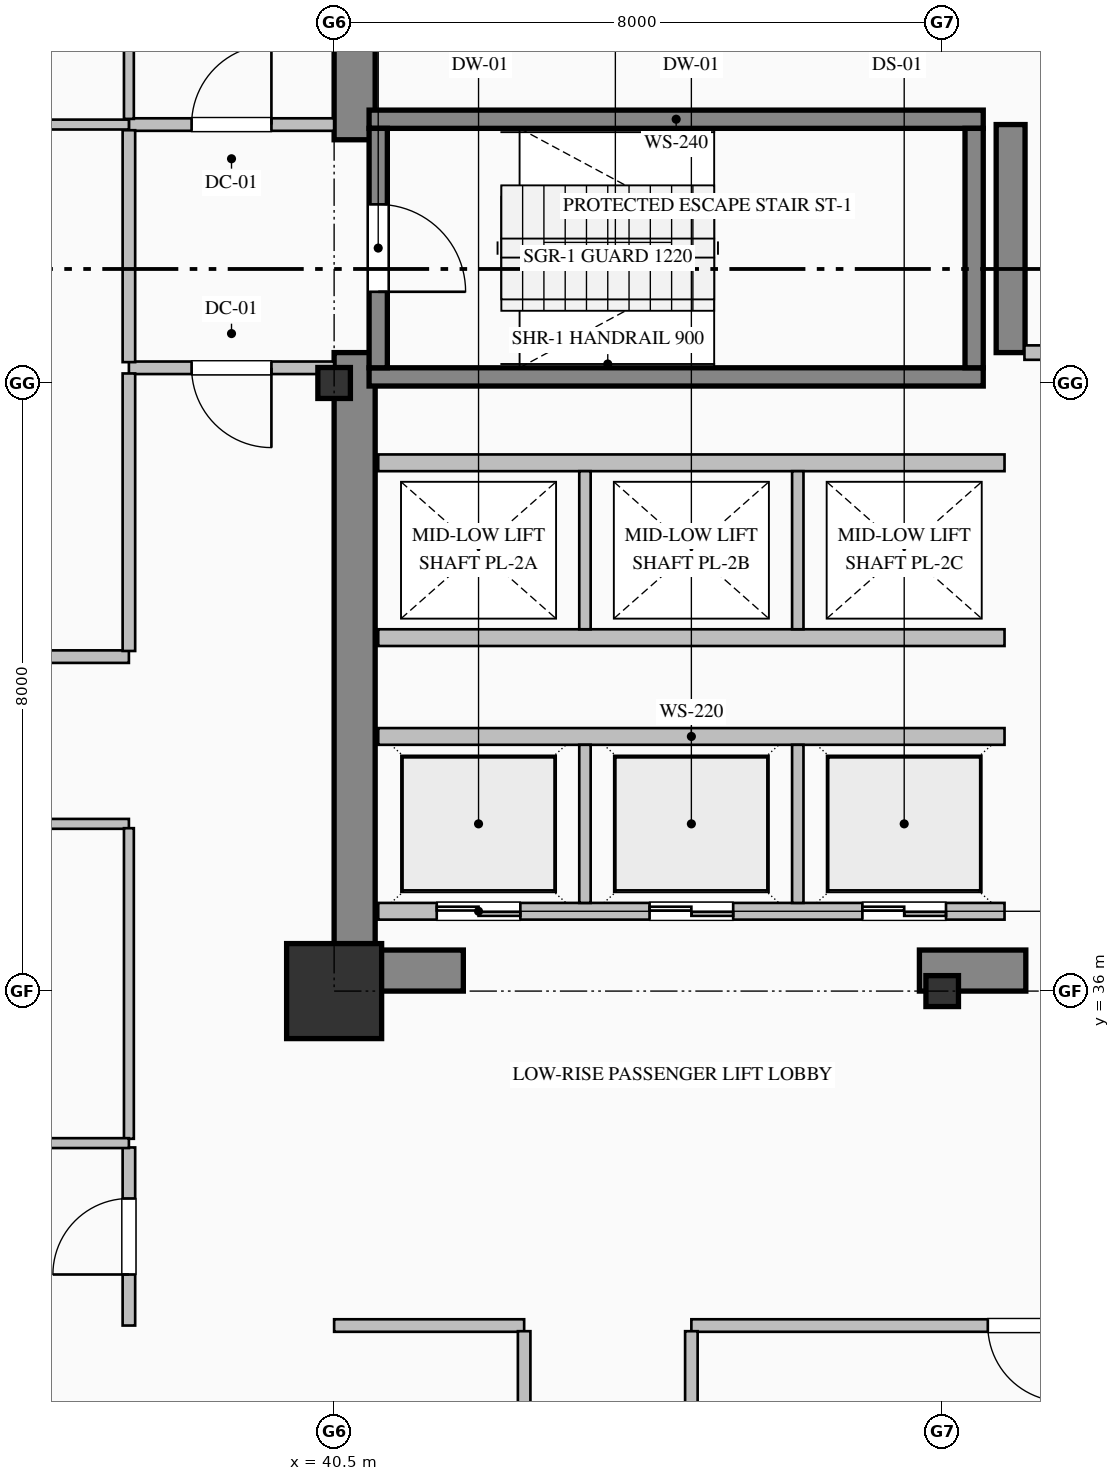
"""IFC4 building model, lengths in metres.
Left out: names, types, materials, properties, quantities, classifications, styles, units other than length and angle.
Written with IfcOpenShell. Run it as: python <this file> out.ifc"""

import sys

from ifc_helpers import new_model, si_unit, direction, frame, frame_2d, origin, origin_2d, place, context, subcontext, project, spatial, rectangle, hollow_rectangle, i_section, extrude, element, fill, save


model = new_model("IFC4")
c1 = context("Model", 3, precision=1e-05, world=origin(), true_north=direction((0.0, 1.0)))
c2 = subcontext(c1, "Body", "Model", "MODEL_VIEW")
j1 = project(units=[si_unit("LENGTHUNIT", "METRE"), si_unit("PLANEANGLEUNIT", "RADIAN")], contexts=[c1])
p1 = place(None, origin())
s1 = spatial("IfcSite", under=j1, at=p1, CompositionType="ELEMENT")
p2 = place(p1, origin())
s2 = spatial("IfcBuilding", under=s1, at=p2, CompositionType="ELEMENT")
p3 = place(p2, frame((0.0, 0.0, 88.2)))
s3 = spatial("IfcBuildingStorey", under=s2, at=p3, CompositionType="ELEMENT", Elevation=88.2)
p4 = place(p3, frame((40.77, 36.54, 0.0), z_axis=(0.0, 0.0, 1.0), x_axis=(0.0, 1.0, 0.0)))
e1 = element("IfcWall", 1, at=p4, inside=s3, PredefinedType="SHEAR", context=c2, shape_type="SweptSolid", body=[
    extrude(rectangle(XDim=7.86, YDim=0.54, at=frame_2d((3.93, 0.0))), origin(), (0.0, 0.0, 1.0), 3.75),
])
p5 = place(p3, frame((40.77, 47.2, 0.0), z_axis=(0.0, 0.0, 1.0), x_axis=(0.0, 1.0, 0.0)))
e2 = element("IfcWall", 2, at=p5, inside=s3, PredefinedType="SHEAR", context=c2, shape_type="SweptSolid", body=[
    extrude(rectangle(XDim=4.26, YDim=0.54, at=frame_2d((2.13, 0.0))), origin(), (0.0, 0.0, 1.0), 3.75),
])
p6 = place(p3, frame((40.5, 36.27, 0.0), z_axis=(0.0, 0.0, 1.0), x_axis=(1.0, 0.0, 0.0)))
e3 = element("IfcWall", 3, at=p6, inside=s3, PredefinedType="SHEAR", context=c2, shape_type="SweptSolid", body=[
    extrude(rectangle(XDim=1.7, YDim=0.54, at=frame_2d((0.85, 0.0))), origin(), (0.0, 0.0, 1.0), 3.75),
])
p7 = place(p3, frame((48.2, 36.27, 0.0), z_axis=(0.0, 0.0, 1.0), x_axis=(1.0, 0.0, 0.0)))
e4 = element("IfcWall", 4, at=p7, inside=s3, PredefinedType="SHEAR", context=c2, shape_type="SweptSolid", body=[
    extrude(rectangle(XDim=1.4, YDim=0.54, at=frame_2d((0.7, 0.0))), origin(), (0.0, 0.0, 1.0), 3.75),
])
p8 = place(p3, frame((49.4, 44.4, 0.0), z_axis=(0.0, 0.0, 1.0), x_axis=(0.0, 1.0, 0.0)))
e5 = element("IfcWall", 5, at=p8, inside=s3, PredefinedType="SHEAR", context=c2, shape_type="SweptSolid", body=[
    extrude(rectangle(XDim=3.0, YDim=0.38, at=frame_2d((1.5, 0.0))), origin(), (0.0, 0.0, 1.0), 3.75),
])
p9 = place(p3, frame((40.5, 36.0, 0.0), z_axis=(0.0, 0.0, 1.0), x_axis=(1.0, 0.0, 0.0)))
e6 = element("IfcColumn", 6, at=p9, inside=s3, PredefinedType="COLUMN", context=c2, shape_type="SweptSolid", body=[
    extrude(hollow_rectangle(XDim=1.25, YDim=1.25, WallThickness=0.045, at=origin_2d()), origin(), (0.0, 0.0, 1.0), 4.0),
])
for number, where, z_axis, x_axis in (
    (7, (40.5, 44.0, 0.0), (0.0, 0.0, 1.0), (1.0, 0.0, 0.0)),
    (8, (48.5, 36.0, 0.0), (0.0, 0.0, 1.0), (1.0, 0.0, 0.0)),
):
    element("IfcColumn", number, at=place(p3, frame(where, z_axis=z_axis, x_axis=x_axis)), inside=s3, PredefinedType="COLUMN", context=c2, shape_type="SweptSolid", body=[
        extrude(i_section(OverallWidth=0.407, OverallDepth=0.428, WebThickness=0.02, FlangeThickness=0.035, FilletRadius=0.022, at=origin_2d()), origin(), (0.0, 0.0, 1.0), 4.0),
    ])
for number, where, z_axis, x_axis in (
    (9, (40.96, 47.47, 0.0), (0.0, 0.0, 1.0), (1.0, 0.0, 0.0)),
    (10, (49.04, 44.08, 0.0), (0.0, 0.0, 1.0), (-1.0, 0.0, 0.0)),
):
    element("IfcWall", number, at=place(p3, frame(where, z_axis=z_axis, x_axis=x_axis)), inside=s3, PredefinedType="SOLIDWALL", context=c2, shape_type="SweptSolid", body=[
        extrude(rectangle(XDim=8.08, YDim=0.24, at=frame_2d((4.04, 0.0))), origin(), (0.0, 0.0, 1.0), 4.0),
    ])
p10 = place(p3, frame((41.08, 47.35, 0.0), z_axis=(0.0, 0.0, 1.0), x_axis=(0.0, -1.0, 0.0)))
e11 = element("IfcWall", 11, at=p10, inside=s3, PredefinedType="SOLIDWALL", context=c2, shape_type="SweptSolid", body=[
    extrude(rectangle(XDim=3.15, YDim=0.24, at=frame_2d((1.575, 0.0))), origin(), (0.0, 0.0, 1.0), 4.0),
])
p11 = place(p10, frame((1.0, 0.0, 0.0)))
e12 = element("IfcOpeningElement", 12, at=p11, cuts=e11, PredefinedType="OPENING", context=c2, shape_type="SweptSolid", body=[
    extrude(rectangle(XDim=1.15, YDim=2.2, at=frame_2d((0.575, 1.1))), frame((0.0, 0.13, 0.0), z_axis=(0.0, -1.0, 0.0), x_axis=(1.0, 0.0, 0.0)), (0.0, 0.0, 1.0), 0.26),
])
p12 = place(p3, frame((48.92, 44.2, 0.0), z_axis=(0.0, 0.0, 1.0), x_axis=(0.0, 1.0, 0.0)))
e13 = element("IfcWall", 13, at=p12, inside=s3, PredefinedType="SOLIDWALL", context=c2, shape_type="SweptSolid", body=[
    extrude(rectangle(XDim=3.15, YDim=0.24, at=frame_2d((1.575, 0.0))), origin(), (0.0, 0.0, 1.0), 4.0),
])
p13 = place(p3, frame((49.32, 37.05, 0.0), z_axis=(0.0, 0.0, 1.0), x_axis=(-1.0, 0.0, 0.0)))
e14 = element("IfcWall", 14, at=p13, inside=s3, PredefinedType="PARTITIONING", context=c2, shape_type="SweptSolid", body=[
    extrude(rectangle(XDim=8.24, YDim=0.22, at=frame_2d((4.12, 0.0))), origin(), (0.0, 0.0, 1.0), 3.75),
])
p14 = place(p13, frame((6.37, 0.0, 0.0)))
e15 = element("IfcOpeningElement", 15, at=p14, cuts=e14, PredefinedType="OPENING", context=c2, shape_type="SweptSolid", body=[
    extrude(rectangle(XDim=1.1, YDim=2.2, at=frame_2d((0.55, 1.1))), frame((0.0, 0.12, 0.0), z_axis=(0.0, -1.0, 0.0), x_axis=(1.0, 0.0, 0.0)), (0.0, 0.0, 1.0), 0.24),
])
p15 = place(p13, frame((3.57, 0.0, 0.0)))
e16 = element("IfcOpeningElement", 16, at=p15, cuts=e14, PredefinedType="OPENING", context=c2, shape_type="SweptSolid", body=[
    extrude(rectangle(XDim=1.1, YDim=2.2, at=frame_2d((0.55, 1.1))), frame((0.0, 0.12, 0.0), z_axis=(0.0, -1.0, 0.0), x_axis=(1.0, 0.0, 0.0)), (0.0, 0.0, 1.0), 0.24),
])
p16 = place(p13, frame((0.77, 0.0, 0.0)))
e17 = element("IfcOpeningElement", 17, at=p16, cuts=e14, PredefinedType="OPENING", context=c2, shape_type="SweptSolid", body=[
    extrude(rectangle(XDim=1.1, YDim=2.2, at=frame_2d((0.55, 1.1))), frame((0.0, 0.12, 0.0), z_axis=(0.0, -1.0, 0.0), x_axis=(1.0, 0.0, 0.0)), (0.0, 0.0, 1.0), 0.24),
])
p17 = place(p3, frame((41.08, 39.35, 0.0), z_axis=(0.0, 0.0, 1.0), x_axis=(1.0, 0.0, 0.0)))
e18 = element("IfcWall", 18, at=p17, inside=s3, PredefinedType="PARTITIONING", context=c2, shape_type="SweptSolid", body=[
    extrude(rectangle(XDim=8.24, YDim=0.22, at=frame_2d((4.12, 0.0))), origin(), (0.0, 0.0, 1.0), 3.75),
])
for number, where, z_axis, x_axis in (
    (19, (43.8, 37.16, 0.0), (0.0, 0.0, 1.0), (0.0, 1.0, 0.0)),
    (20, (46.6, 37.16, 0.0), (0.0, 0.0, 1.0), (0.0, 1.0, 0.0)),
):
    element("IfcWall", number, at=place(p3, frame(where, z_axis=z_axis, x_axis=x_axis)), inside=s3, PredefinedType="PARTITIONING", context=c2, shape_type="SweptSolid", body=[
        extrude(rectangle(XDim=2.08, YDim=0.15, at=frame_2d((1.04, 0.0))), origin(), (0.0, 0.0, 1.0), 3.75),
    ])
for number, where, z_axis, x_axis in (
    (21, (49.32, 40.65, 0.0), (0.0, 0.0, 1.0), (-1.0, 0.0, 0.0)),
    (22, (41.08, 42.95, 0.0), (0.0, 0.0, 1.0), (1.0, 0.0, 0.0)),
):
    element("IfcWall", number, at=place(p3, frame(where, z_axis=z_axis, x_axis=x_axis)), inside=s3, PredefinedType="PARTITIONING", context=c2, shape_type="SweptSolid", body=[
        extrude(rectangle(XDim=8.24, YDim=0.22, at=frame_2d((4.12, 0.0))), origin(), (0.0, 0.0, 1.0), 3.75),
    ])
for number, where, z_axis, x_axis in (
    (23, (43.8, 40.76, 0.0), (0.0, 0.0, 1.0), (0.0, 1.0, 0.0)),
    (24, (46.6, 40.76, 0.0), (0.0, 0.0, 1.0), (0.0, 1.0, 0.0)),
):
    element("IfcWall", number, at=place(p3, frame(where, z_axis=z_axis, x_axis=x_axis)), inside=s3, PredefinedType="PARTITIONING", context=c2, shape_type="SweptSolid", body=[
        extrude(rectangle(XDim=2.08, YDim=0.15, at=frame_2d((1.04, 0.0))), origin(), (0.0, 0.0, 1.0), 3.75),
    ])
p18 = place(p3, frame((37.8, 47.4, 0.0), z_axis=(0.0, 0.0, 1.0), x_axis=(1.0, 0.0, 0.0)))
e25 = element("IfcWall", 25, at=p18, inside=s3, PredefinedType="PARTITIONING", context=c2, shape_type="SweptSolid", body=[
    extrude(rectangle(XDim=2.7, YDim=0.165, at=frame_2d((1.35, 0.0))), origin(), (0.0, 0.0, 1.0), 3.75),
])
p19 = place(p18, frame((0.825, 0.0, 0.0)))
e26 = element("IfcOpeningElement", 26, at=p19, cuts=e25, PredefinedType="OPENING", context=c2, shape_type="SweptSolid", body=[
    extrude(rectangle(XDim=1.05, YDim=2.15, at=frame_2d((0.525, 1.075))), frame((0.0, 0.093, 0.0), z_axis=(0.0, -1.0, 0.0), x_axis=(1.0, 0.0, 0.0)), (0.0, 0.0, 1.0), 0.185),
])
p20 = place(p3, frame((40.5, 44.2, 0.0), z_axis=(0.0, 0.0, 1.0), x_axis=(-1.0, 0.0, 0.0)))
e27 = element("IfcWall", 27, at=p20, inside=s3, PredefinedType="PARTITIONING", context=c2, shape_type="SweptSolid", body=[
    extrude(rectangle(XDim=2.7, YDim=0.165, at=frame_2d((1.35, 0.0))), origin(), (0.0, 0.0, 1.0), 3.75),
])
p21 = place(p20, frame((0.825, 0.0, 0.0)))
e28 = element("IfcOpeningElement", 28, at=p21, cuts=e27, PredefinedType="OPENING", context=c2, shape_type="SweptSolid", body=[
    extrude(rectangle(XDim=1.05, YDim=2.15, at=frame_2d((0.525, 1.075))), frame((0.0, 0.093, 0.0), z_axis=(0.0, -1.0, 0.0), x_axis=(1.0, 0.0, 0.0)), (0.0, 0.0, 1.0), 0.185),
])
p22 = place(p3, frame((37.8, 44.274, 0.0), z_axis=(0.0, 0.0, 1.0), x_axis=(0.0, 1.0, 0.0)))
e29 = element("IfcWall", 29, at=p22, inside=s3, PredefinedType="PARTITIONING", context=c2, shape_type="SweptSolid", body=[
    extrude(rectangle(XDim=3.051, YDim=0.165, at=frame_2d((1.525, 0.0))), origin(), (0.0, 0.0, 1.0), 3.75),
])
p23 = place(p3, frame((37.8, 47.475, 0.0), z_axis=(0.0, 0.0, 1.0), x_axis=(0.0, 1.0, 0.0)))
e30 = element("IfcWall", 30, at=p23, inside=s3, PredefinedType="PARTITIONING", context=c2, shape_type="SweptSolid", body=[
    extrude(rectangle(XDim=4.173, YDim=0.13, at=frame_2d((2.087, 0.0))), origin(), (0.0, 0.0, 1.0), 3.75),
])
p24 = place(p23, frame((1.577, 0.0, 0.0)))
e31 = element("IfcOpeningElement", 31, at=p24, cuts=e30, PredefinedType="OPENING", context=c2, shape_type="SweptSolid", body=[
    extrude(rectangle(XDim=1.02, YDim=2.15, at=frame_2d((0.51, 1.075))), frame((0.0, 0.075, 0.0), z_axis=(0.0, -1.0, 0.0), x_axis=(1.0, 0.0, 0.0)), (0.0, 0.0, 1.0), 0.15),
])
p25 = place(p3, frame((37.8, 47.4, 0.0), z_axis=(0.0, 0.0, 1.0), x_axis=(-1.0, 0.0, 0.0)))
e32 = element("IfcWall", 32, at=p25, inside=s3, PredefinedType="PARTITIONING", context=c2, shape_type="SweptSolid", body=[
    extrude(rectangle(XDim=2.4, YDim=0.13, at=frame_2d((1.2, 0.0))), origin(), (0.0, 0.0, 1.0), 3.75),
])
p26 = place(p3, frame((54.718, 44.4, 0.0), z_axis=(0.0, 0.0, 1.0), x_axis=(-1.0, 0.0, 0.0)))
e33 = element("IfcWall", 33, at=p26, inside=s3, PredefinedType="PARTITIONING", context=c2, shape_type="SweptSolid", body=[
    extrude(rectangle(XDim=5.136, YDim=0.19, at=frame_2d((2.568, 0.0))), origin(), (0.0, 0.0, 1.0), 3.75),
])
p27 = place(p26, frame((2.043, 0.0, 0.0)))
e34 = element("IfcOpeningElement", 34, at=p27, cuts=e33, PredefinedType="OPENING", context=c2, shape_type="SweptSolid", body=[
    extrude(rectangle(XDim=1.05, YDim=2.15, at=frame_2d((0.525, 1.075))), frame((0.0, 0.105, 0.0), z_axis=(0.0, -1.0, 0.0), x_axis=(1.0, 0.0, 0.0)), (0.0, 0.0, 1.0), 0.21),
])
p28 = place(p3, frame((27.5, 40.4, 0.0), z_axis=(0.0, 0.0, 1.0), x_axis=(1.0, 0.0, 0.0)))
e35 = element("IfcWall", 35, at=p28, inside=s3, PredefinedType="PARTITIONING", context=c2, shape_type="SweptSolid", body=[
    extrude(rectangle(XDim=10.3, YDim=0.165, at=frame_2d((5.15, 0.0))), origin(), (0.0, 0.0, 1.0), 3.75),
])
p29 = place(p28, frame((4.65, 0.0, 0.0)))
e36 = element("IfcOpeningElement", 36, at=p29, cuts=e35, PredefinedType="OPENING", context=c2, shape_type="SweptSolid", body=[
    extrude(rectangle(XDim=1.0, YDim=2.15, at=frame_2d((0.5, 1.075))), frame((0.0, 0.093, 0.0), z_axis=(0.0, -1.0, 0.0), x_axis=(1.0, 0.0, 0.0)), (0.0, 0.0, 1.0), 0.185),
])
p30 = place(p3, frame((37.8, 38.2, 0.0), z_axis=(0.0, 0.0, 1.0), x_axis=(-1.0, 0.0, 0.0)))
e37 = element("IfcWall", 37, at=p30, inside=s3, PredefinedType="PARTITIONING", context=c2, shape_type="SweptSolid", body=[
    extrude(rectangle(XDim=11.8, YDim=0.13, at=frame_2d((5.9, 0.0))), origin(), (0.0, 0.0, 1.0), 3.75),
])
p31 = place(p30, frame((5.4, 0.0, 0.0)))
e38 = element("IfcOpeningElement", 38, at=p31, cuts=e37, PredefinedType="OPENING", context=c2, shape_type="SweptSolid", body=[
    extrude(rectangle(XDim=1.0, YDim=2.15, at=frame_2d((0.5, 1.075))), frame((0.0, 0.075, 0.0), z_axis=(0.0, -1.0, 0.0), x_axis=(1.0, 0.0, 0.0)), (0.0, 0.0, 1.0), 0.15),
])
p32 = place(p3, frame((37.8, 40.475, 0.0), z_axis=(0.0, 0.0, 1.0), x_axis=(0.0, 1.0, 0.0)))
e39 = element("IfcWall", 39, at=p32, inside=s3, PredefinedType="PARTITIONING", context=c2, shape_type="SweptSolid", body=[
    extrude(rectangle(XDim=3.651, YDim=0.165, at=frame_2d((1.825, 0.0))), origin(), (0.0, 0.0, 1.0), 3.75),
])
p33 = place(p3, frame((37.8, 31.6, 0.0), z_axis=(0.0, 0.0, 1.0), x_axis=(0.0, 1.0, 0.0)))
e40 = element("IfcWall", 40, at=p33, inside=s3, PredefinedType="PARTITIONING", context=c2, shape_type="SweptSolid", body=[
    extrude(rectangle(XDim=2.343, YDim=0.165, at=frame_2d((1.171, 0.0))), origin(), (0.0, 0.0, 1.0), 3.75),
])
p34 = place(p33, frame((0.671, 0.0, 0.0)))
e41 = element("IfcOpeningElement", 41, at=p34, cuts=e40, PredefinedType="OPENING", context=c2, shape_type="SweptSolid", body=[
    extrude(rectangle(XDim=1.0, YDim=2.15, at=frame_2d((0.5, 1.075))), frame((0.0, 0.093, 0.0), z_axis=(0.0, -1.0, 0.0), x_axis=(1.0, 0.0, 0.0)), (0.0, 0.0, 1.0), 0.185),
])
p35 = place(p3, frame((37.8, 34.057, 0.0), z_axis=(0.0, 0.0, 1.0), x_axis=(0.0, 1.0, 0.0)))
e42 = element("IfcWall", 42, at=p35, inside=s3, PredefinedType="PARTITIONING", context=c2, shape_type="SweptSolid", body=[
    extrude(rectangle(XDim=4.086, YDim=0.13, at=frame_2d((2.043, 0.0))), origin(), (0.0, 0.0, 1.0), 3.75),
])
p36 = place(p3, frame((54.0, 31.6, 0.0), z_axis=(0.0, 0.0, 1.0), x_axis=(-1.0, 0.0, 0.0)))
e43 = element("IfcWall", 43, at=p36, inside=s3, PredefinedType="PARTITIONING", context=c2, shape_type="SweptSolid", body=[
    extrude(rectangle(XDim=8.8, YDim=0.165, at=frame_2d((4.4, 0.0))), origin(), (0.0, 0.0, 1.0), 3.75),
])
p37 = place(p36, frame((3.9, 0.0, 0.0)))
e44 = element("IfcOpeningElement", 44, at=p37, cuts=e43, PredefinedType="OPENING", context=c2, shape_type="SweptSolid", body=[
    extrude(rectangle(XDim=1.0, YDim=2.15, at=frame_2d((0.5, 1.075))), frame((0.0, 0.093, 0.0), z_axis=(0.0, -1.0, 0.0), x_axis=(1.0, 0.0, 0.0)), (0.0, 0.0, 1.0), 0.185),
])
p38 = place(p3, frame((43.0, 31.6, 0.0), z_axis=(0.0, 0.0, 1.0), x_axis=(-1.0, 0.0, 0.0)))
e45 = element("IfcWall", 45, at=p38, inside=s3, PredefinedType="PARTITIONING", context=c2, shape_type="SweptSolid", body=[
    extrude(rectangle(XDim=2.5, YDim=0.165, at=frame_2d((1.25, 0.0))), origin(), (0.0, 0.0, 1.0), 3.75),
])
p39 = place(p3, frame((45.2, 31.525, 0.0), z_axis=(0.0, 0.0, 1.0), x_axis=(0.0, -1.0, 0.0)))
e46 = element("IfcWall", 46, at=p39, inside=s3, PredefinedType="PARTITIONING", context=c2, shape_type="SweptSolid", body=[
    extrude(rectangle(XDim=6.128, YDim=0.165, at=frame_2d((3.064, 0.0))), origin(), (0.0, 0.0, 1.0), 3.75),
])
p40 = place(p3, frame((43.0, 12.574, 0.0), z_axis=(0.0, 0.0, 1.0), x_axis=(0.0, 1.0, 0.0)))
e47 = element("IfcWall", 47, at=p40, inside=s3, PredefinedType="PARTITIONING", context=c2, shape_type="SweptSolid", body=[
    extrude(rectangle(XDim=18.951, YDim=0.165, at=frame_2d((9.476, 0.0))), origin(), (0.0, 0.0, 1.0), 3.75),
])
p41 = place(p40, frame((9.025, 0.0, 0.0)))
e48 = element("IfcOpeningElement", 48, at=p41, cuts=e47, PredefinedType="OPENING", context=c2, shape_type="SweptSolid", body=[
    extrude(rectangle(XDim=0.9, YDim=2.15, at=frame_2d((0.45, 1.075))), frame((0.0, 0.093, 0.0), z_axis=(0.0, -1.0, 0.0), x_axis=(1.0, 0.0, 0.0)), (0.0, 0.0, 1.0), 0.185),
])
p42 = place(p3, frame((26.0, 34.0, 0.0), z_axis=(0.0, 0.0, 1.0), x_axis=(1.0, 0.0, 0.0)))
e49 = element("IfcWall", 49, at=p42, inside=s3, PredefinedType="PARTITIONING", context=c2, shape_type="SweptSolid", body=[
    extrude(rectangle(XDim=11.8, YDim=0.13, at=frame_2d((5.9, 0.0))), origin(), (0.0, 0.0, 1.0), 3.75),
])
p43 = place(p11, origin())
e50 = element("IfcDoor", 50, at=p43, inside=s3, OperationType="SINGLE_SWING_RIGHT", PredefinedType="DOOR", context=c2, shape_type="SweptSolid", body=[
    extrude(rectangle(XDim=1.15, YDim=2.2, at=frame_2d((0.575, 1.1))), frame((0.0, 0.025, 0.0), z_axis=(0.0, -1.0, 0.0), x_axis=(1.0, 0.0, 0.0)), (0.0, 0.0, 1.0), 0.05),
])
fill(e12, e50)
p44 = place(p14, origin())
e51 = element("IfcDoor", 51, at=p44, inside=s3, OperationType="DOUBLE_DOOR_SLIDING", PredefinedType="DOOR", context=c2, shape_type="SweptSolid", body=[
    extrude(rectangle(XDim=1.1, YDim=2.2, at=frame_2d((0.55, 1.1))), frame((0.0, 0.025, 0.0), z_axis=(0.0, -1.0, 0.0), x_axis=(1.0, 0.0, 0.0)), (0.0, 0.0, 1.0), 0.05),
])
fill(e15, e51)
p45 = place(p15, origin())
e52 = element("IfcDoor", 52, at=p45, inside=s3, OperationType="DOUBLE_DOOR_SLIDING", PredefinedType="DOOR", context=c2, shape_type="SweptSolid", body=[
    extrude(rectangle(XDim=1.1, YDim=2.2, at=frame_2d((0.55, 1.1))), frame((0.0, 0.025, 0.0), z_axis=(0.0, -1.0, 0.0), x_axis=(1.0, 0.0, 0.0)), (0.0, 0.0, 1.0), 0.05),
])
fill(e16, e52)
p46 = place(p16, origin())
e53 = element("IfcDoor", 53, at=p46, inside=s3, OperationType="DOUBLE_DOOR_SLIDING", PredefinedType="DOOR", context=c2, shape_type="SweptSolid", body=[
    extrude(rectangle(XDim=1.1, YDim=2.2, at=frame_2d((0.55, 1.1))), frame((0.0, 0.025, 0.0), z_axis=(0.0, -1.0, 0.0), x_axis=(1.0, 0.0, 0.0)), (0.0, 0.0, 1.0), 0.05),
])
fill(e17, e53)
p47 = place(p19, origin())
e54 = element("IfcDoor", 54, at=p47, inside=s3, OperationType="SINGLE_SWING_RIGHT", PredefinedType="DOOR", context=c2, shape_type="SweptSolid", body=[
    extrude(rectangle(XDim=1.05, YDim=2.15, at=frame_2d((0.525, 1.075))), frame((0.0, 0.025, 0.0), z_axis=(0.0, -1.0, 0.0), x_axis=(1.0, 0.0, 0.0)), (0.0, 0.0, 1.0), 0.05),
])
fill(e26, e54)
p48 = place(p21, origin())
e55 = element("IfcDoor", 55, at=p48, inside=s3, OperationType="SINGLE_SWING_LEFT", PredefinedType="DOOR", context=c2, shape_type="SweptSolid", body=[
    extrude(rectangle(XDim=1.05, YDim=2.15, at=frame_2d((0.525, 1.075))), frame((0.0, 0.025, 0.0), z_axis=(0.0, -1.0, 0.0), x_axis=(1.0, 0.0, 0.0)), (0.0, 0.0, 1.0), 0.05),
])
fill(e28, e55)
p49 = place(p37, origin())
e56 = element("IfcDoor", 56, at=p49, inside=s3, OperationType="SINGLE_SWING_LEFT", PredefinedType="DOOR", context=c2, shape_type="SweptSolid", body=[
    extrude(rectangle(XDim=1.0, YDim=2.15, at=frame_2d((0.5, 1.075))), frame((0.0, 0.025, 0.0), z_axis=(0.0, -1.0, 0.0), x_axis=(1.0, 0.0, 0.0)), (0.0, 0.0, 1.0), 0.05),
])
fill(e44, e56)
p50 = place(p34, origin())
e57 = element("IfcDoor", 57, at=p50, inside=s3, OperationType="SINGLE_SWING_LEFT", PredefinedType="DOOR", context=c2, shape_type="SweptSolid", body=[
    extrude(rectangle(XDim=1.0, YDim=2.15, at=frame_2d((0.5, 1.075))), frame((0.0, 0.025, 0.0), z_axis=(0.0, -1.0, 0.0), x_axis=(1.0, 0.0, 0.0)), (0.0, 0.0, 1.0), 0.05),
])
fill(e41, e57)
save(model, sys.argv[1])
